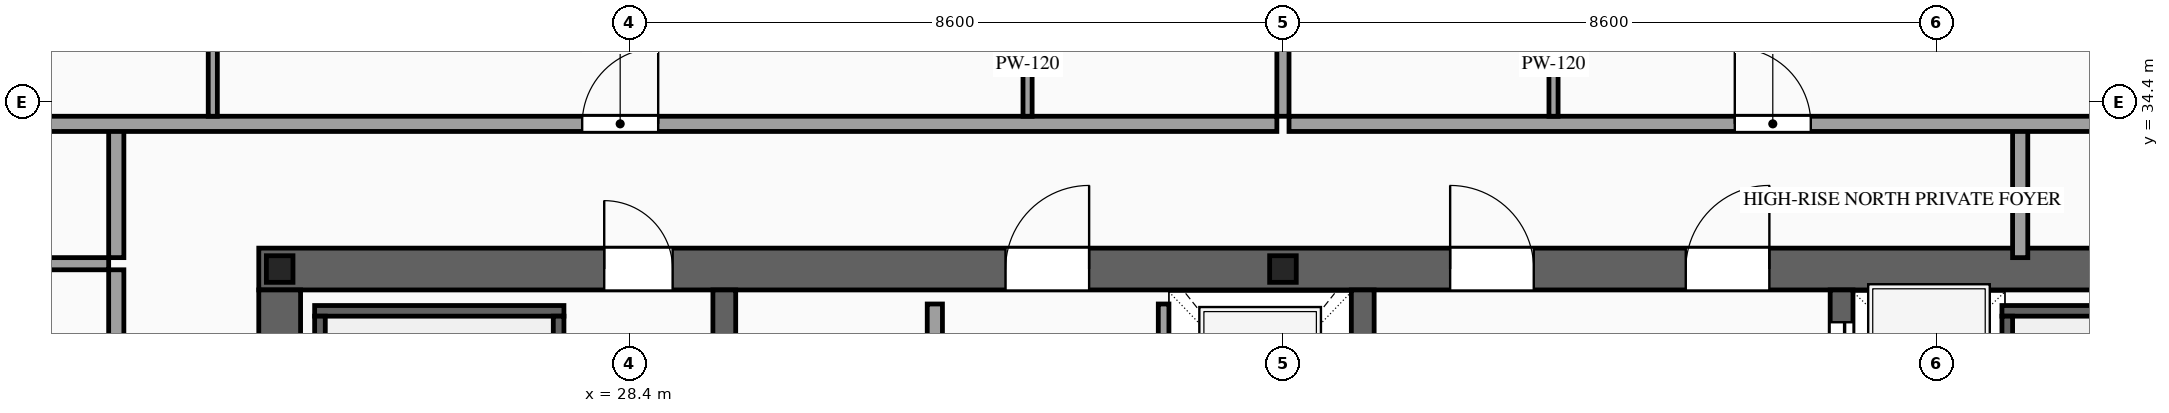
"""IFC4 building model, lengths in metres.
Left out: names, types, materials, properties, quantities, classifications, styles, units other than length and angle.
Written with IfcOpenShell. Run it as: python <this file> out.ifc"""

import sys

from ifc_helpers import new_model, si_unit, direction, frame, frame_2d, origin, origin_2d, place, context, subcontext, project, spatial, rectangle, i_section, extrude, source, transform, mapped, element, fill, save


model = new_model("IFC4")
c1 = context("Model", 3, precision=1e-05, world=origin(), true_north=direction((0.0, 1.0)))
c2 = subcontext(c1, "Body", "Model", "MODEL_VIEW")
j1 = project(units=[si_unit("LENGTHUNIT", "METRE"), si_unit("PLANEANGLEUNIT", "RADIAN")], contexts=[c1])
p1 = place(None, origin())
s1 = spatial("IfcSite", under=j1, at=p1, CompositionType="ELEMENT")
p2 = place(p1, origin())
s2 = spatial("IfcBuilding", under=s1, at=p2, CompositionType="ELEMENT")
p3 = place(p2, frame((0.0, 0.0, 268.1)))
s3 = spatial("IfcBuildingStorey", under=s2, at=p3, CompositionType="ELEMENT", Elevation=268.1)
p4 = place(p3, frame((23.525, 32.2, 0.0), z_axis=(0.0, 0.0, 1.0), x_axis=(1.0, 0.0, 0.0)))
e1 = element("IfcWall", 1, at=p4, inside=s3, PredefinedType="SHEAR", context=c2, shape_type="SweptSolid", body=[
    extrude(rectangle(XDim=26.95, YDim=0.55, at=frame_2d((13.475, 0.0))), origin(), (0.0, 0.0, 1.0), 3.5),
])
p5 = place(p4, frame((4.545, 0.0, 0.0)))
e2 = element("IfcOpeningElement", 2, at=p5, cuts=e1, PredefinedType="OPENING", context=c2, shape_type="SweptSolid", body=[
    extrude(rectangle(XDim=0.9, YDim=2.15, at=frame_2d((0.45, 1.075))), frame((0.0, 0.29, 0.0), z_axis=(0.0, -1.0, 0.0), x_axis=(1.0, 0.0, 0.0)), (0.0, 0.0, 1.0), 0.58),
])
p6 = place(p4, frame((9.825, 0.0, 0.0)))
e3 = element("IfcOpeningElement", 3, at=p6, cuts=e1, PredefinedType="OPENING", context=c2, shape_type="SweptSolid", body=[
    extrude(rectangle(XDim=1.1, YDim=2.2, at=frame_2d((0.55, 1.1))), frame((0.0, 0.29, 0.0), z_axis=(0.0, -1.0, 0.0), x_axis=(1.0, 0.0, 0.0)), (0.0, 0.0, 1.0), 0.58),
])
p7 = place(p4, frame((15.675, 0.0, 0.0)))
e4 = element("IfcOpeningElement", 4, at=p7, cuts=e1, PredefinedType="OPENING", context=c2, shape_type="SweptSolid", body=[
    extrude(rectangle(XDim=1.1, YDim=2.2, at=frame_2d((0.55, 1.1))), frame((0.0, 0.29, 0.0), z_axis=(0.0, -1.0, 0.0), x_axis=(1.0, 0.0, 0.0)), (0.0, 0.0, 1.0), 0.58),
])
p8 = place(p4, frame((18.775, 0.0, 0.0)))
e5 = element("IfcOpeningElement", 5, at=p8, cuts=e1, PredefinedType="OPENING", context=c2, shape_type="SweptSolid", body=[
    extrude(rectangle(XDim=1.1, YDim=2.2, at=frame_2d((0.55, 1.1))), frame((0.0, 0.29, 0.0), z_axis=(0.0, -1.0, 0.0), x_axis=(1.0, 0.0, 0.0)), (0.0, 0.0, 1.0), 0.58),
])
m1 = source(origin(), c2, "Body", "SweptSolid", [
    extrude(rectangle(XDim=12.25, YDim=0.55, at=frame_2d((6.125, 0.0))), origin(), (0.0, 0.0, 1.0), 3.5),
])
p9 = place(p3, frame((23.8, 19.675, 0.0), z_axis=(0.0, 0.0, 1.0), x_axis=(0.0, 1.0, 0.0)))
e6 = element("IfcWall", 6, at=p9, inside=s3, PredefinedType="SHEAR", context=c2, shape_type="MappedRepresentation", body=[
    mapped(m1, transform((0.0, 0.0, 0.0), scale=1.0)),
])
m2 = source(origin(), c2, "Body", "SweptSolid", [
    extrude(rectangle(XDim=12.25, YDim=0.3, at=frame_2d((6.125, 0.0))), origin(), (0.0, 0.0, 1.0), 3.5),
])
for number, where, z_axis, x_axis in (
    (7, (29.65, 19.675, 0.0), (0.0, 0.0, 1.0), (0.0, 1.0, 0.0)),
    (8, (38.05, 19.675, 0.0), (0.0, 0.0, 1.0), (0.0, 1.0, 0.0)),
):
    element("IfcWall", number, at=place(p3, frame(where, z_axis=z_axis, x_axis=x_axis)), inside=s3, PredefinedType="SOLIDWALL", context=c2, shape_type="MappedRepresentation", body=[
        mapped(m2, transform((0.0, 0.0, 0.0), scale=1.0)),
    ])
p10 = place(p3, frame((44.35, 19.675, 0.0), z_axis=(0.0, 0.0, 1.0), x_axis=(0.0, 1.0, 0.0)))
e9 = element("IfcWall", 9, at=p10, inside=s3, PredefinedType="SOLIDWALL", context=c2, shape_type="SweptSolid", body=[
    extrude(rectangle(XDim=12.25, YDim=0.3, at=frame_2d((6.125, 0.0))), origin(), (0.0, 0.0, 1.0), 3.5),
])
p11 = place(p10, frame((6.525, 0.0, 0.0)))
e10 = element("IfcOpeningElement", 10, at=p11, cuts=e9, PredefinedType="OPENING", context=c2, shape_type="SweptSolid", body=[
    extrude(rectangle(XDim=1.1, YDim=2.2, at=frame_2d((0.55, 1.1))), frame((0.0, 0.165, 0.0), z_axis=(0.0, -1.0, 0.0), x_axis=(1.0, 0.0, 0.0)), (0.0, 0.0, 1.0), 0.33),
])
p12 = place(p10, frame((8.625, 0.0, 0.0)))
e11 = element("IfcOpeningElement", 11, at=p12, cuts=e9, PredefinedType="OPENING", context=c2, shape_type="SweptSolid", body=[
    extrude(rectangle(XDim=1.1, YDim=2.2, at=frame_2d((0.55, 1.1))), frame((0.0, 0.165, 0.0), z_axis=(0.0, -1.0, 0.0), x_axis=(1.0, 0.0, 0.0)), (0.0, 0.0, 1.0), 0.33),
])
p13 = place(p10, frame((10.725, 0.0, 0.0)))
e12 = element("IfcOpeningElement", 12, at=p13, cuts=e9, PredefinedType="OPENING", context=c2, shape_type="SweptSolid", body=[
    extrude(rectangle(XDim=1.1, YDim=2.2, at=frame_2d((0.55, 1.1))), frame((0.0, 0.165, 0.0), z_axis=(0.0, -1.0, 0.0), x_axis=(1.0, 0.0, 0.0)), (0.0, 0.0, 1.0), 0.33),
])
m3 = source(origin(), c2, "Body", "SweptSolid", [
    extrude(i_section(OverallWidth=0.35, OverallDepth=0.35, WebThickness=0.012, FlangeThickness=0.019, at=origin_2d()), origin(), (0.0, 0.0, 1.0), 3.5),
])
for number, where, z_axis, x_axis in (
    (13, (23.8, 32.2, 0.0), (0.0, 0.0, 1.0), (1.0, 0.0, 0.0)),
    (14, (37.0, 32.2, 0.0), (0.0, 0.0, 1.0), (1.0, 0.0, 0.0)),
):
    element("IfcColumn", number, at=place(p3, frame(where, z_axis=z_axis, x_axis=x_axis)), inside=s3, PredefinedType="COLUMN", context=c2, shape_type="MappedRepresentation", body=[
        mapped(m3, transform((0.0, 0.0, 0.0), scale=1.0)),
    ])
p14 = place(p3, frame((35.43, 29.4, 0.0), z_axis=(0.0, 0.0, 1.0), x_axis=(0.0, 1.0, 0.0)))
e15 = element("IfcWall", 15, at=p14, inside=s3, PredefinedType="SOLIDWALL", context=c2, shape_type="SweptSolid", body=[
    extrude(rectangle(XDim=2.34, YDim=0.14, at=frame_2d((1.17, 0.0))), origin(), (0.0, 0.0, 1.0), 3.28),
])
p15 = place(p14, frame((0.62, 0.0, 0.0)))
e16 = element("IfcOpeningElement", 16, at=p15, cuts=e15, PredefinedType="OPENING", context=c2, shape_type="SweptSolid", body=[
    extrude(rectangle(XDim=1.1, YDim=2.2, at=frame_2d((0.55, 1.1))), frame((0.0, 0.085, 0.0), z_axis=(0.0, -1.0, 0.0), x_axis=(1.0, 0.0, 0.0)), (0.0, 0.0, 1.0), 0.17),
])
m4 = source(origin(), c2, "Body", "SweptSolid", [
    extrude(rectangle(XDim=3.28, YDim=0.14, at=frame_2d((1.64, 0.0))), origin(), (0.0, 0.0, 1.0), 3.28),
])
p16 = place(p3, frame((24.26, 31.65, 0.0), z_axis=(0.0, 0.0, 1.0), x_axis=(1.0, 0.0, 0.0)))
e17 = element("IfcWall", 17, at=p16, inside=s3, PredefinedType="SOLIDWALL", context=c2, shape_type="MappedRepresentation", body=[
    mapped(m4, transform((0.0, 0.0, 0.0), scale=1.0)),
])
m5 = source(origin(), c2, "Body", "SweptSolid", [
    extrude(rectangle(XDim=8.94, YDim=0.14, at=frame_2d((4.47, 0.0))), origin(), (0.0, 0.0, 1.0), 3.28),
])
for number, where, z_axis, x_axis in (
    (18, (24.33, 22.64, 0.0), (0.0, 0.0, 1.0), (0.0, 1.0, 0.0)),
    (19, (27.47, 22.64, 0.0), (0.0, 0.0, 1.0), (0.0, 1.0, 0.0)),
):
    element("IfcWall", number, at=place(p3, frame(where, z_axis=z_axis, x_axis=x_axis)), inside=s3, PredefinedType="SOLIDWALL", context=c2, shape_type="MappedRepresentation", body=[
        mapped(m5, transform((0.0, 0.0, 0.0), scale=1.0)),
    ])
p17 = place(p3, frame((46.46, 31.65, 0.0), z_axis=(0.0, 0.0, 1.0), x_axis=(1.0, 0.0, 0.0)))
e20 = element("IfcWall", 20, at=p17, inside=s3, PredefinedType="SOLIDWALL", context=c2, shape_type="MappedRepresentation", body=[
    mapped(m4, transform((0.0, 0.0, 0.0), scale=1.0)),
])
p18 = place(p3, frame((46.53, 22.64, 0.0), z_axis=(0.0, 0.0, 1.0), x_axis=(0.0, 1.0, 0.0)))
e21 = element("IfcWall", 21, at=p18, inside=s3, PredefinedType="SOLIDWALL", context=c2, shape_type="MappedRepresentation", body=[
    mapped(m5, transform((0.0, 0.0, 0.0), scale=1.0)),
])
p19 = place(p3, frame((32.42, 28.05, 0.0), z_axis=(0.0, 0.0, 1.0), x_axis=(0.0, 1.0, 0.0)))
e22 = element("IfcWall", 22, at=p19, inside=s3, PredefinedType="PARTITIONING", context=c2, shape_type="SweptSolid", body=[
    extrude(rectangle(XDim=3.69, YDim=0.2, at=frame_2d((1.845, 0.0))), origin(), (0.0, 0.0, 1.0), 3.28),
])
p20 = place(p19, frame((1.395, 0.0, 0.0)))
e23 = element("IfcOpeningElement", 23, at=p20, cuts=e22, PredefinedType="OPENING", context=c2, shape_type="SweptSolid", body=[
    extrude(rectangle(XDim=0.9, YDim=2.15, at=frame_2d((0.45, 1.075))), frame((0.0, 0.115, 0.0), z_axis=(0.0, -1.0, 0.0), x_axis=(1.0, 0.0, 0.0)), (0.0, 0.0, 1.0), 0.23),
])
m6 = source(origin(), c2, "Body", "SweptSolid", [
    extrude(rectangle(XDim=1.7, YDim=0.2, at=frame_2d((0.85, 0.0))), origin(), (0.0, 0.0, 1.0), 3.28),
])
for number, where, z_axis, x_axis in (
    (24, (21.65, 32.35, 0.0), (0.0, 0.0, 1.0), (0.0, 1.0, 0.0)),
    (25, (46.7, 32.35, 0.0), (0.0, 0.0, 1.0), (0.0, 1.0, 0.0)),
):
    element("IfcWall", number, at=place(p3, frame(where, z_axis=z_axis, x_axis=x_axis)), inside=s3, PredefinedType="PARTITIONING", context=c2, shape_type="MappedRepresentation", body=[
        mapped(m6, transform((0.0, 0.0, 0.0), scale=1.0)),
    ])
p21 = place(p3, frame((19.44, 34.11, 0.0), z_axis=(0.0, 0.0, 1.0), x_axis=(1.0, 0.0, 0.0)))
e26 = element("IfcWall", 26, at=p21, inside=s3, PredefinedType="PARTITIONING", context=c2, shape_type="SweptSolid", body=[
    extrude(rectangle(XDim=17.48, YDim=0.2, at=frame_2d((8.74, 0.0))), origin(), (0.0, 0.0, 1.0), 3.28),
])
p22 = place(p21, frame((8.34, 0.0, 0.0)))
e27 = element("IfcOpeningElement", 27, at=p22, cuts=e26, PredefinedType="OPENING", context=c2, shape_type="SweptSolid", body=[
    extrude(rectangle(XDim=1.0, YDim=2.2, at=frame_2d((0.5, 1.1))), frame((0.0, 0.115, 0.0), z_axis=(0.0, -1.0, 0.0), x_axis=(1.0, 0.0, 0.0)), (0.0, 0.0, 1.0), 0.23),
])
m7 = source(origin(), c2, "Body", "SweptSolid", [
    extrude(rectangle(XDim=12.04, YDim=0.16, at=frame_2d((6.02, 0.0))), origin(), (0.0, 0.0, 1.0), 2.787),
])
p23 = place(p3, frame((37.0, 34.21, 0.0), z_axis=(0.0, 0.0, 1.0), x_axis=(0.0, 1.0, 0.0)))
e28 = element("IfcWall", 28, at=p23, inside=s3, PredefinedType="PARTITIONING", context=c2, shape_type="MappedRepresentation", body=[
    mapped(m7, transform((0.0, 0.0, 0.0), scale=1.0)),
])
p24 = place(p3, frame((22.92, 34.21, 0.0), z_axis=(0.0, 0.0, 1.0), x_axis=(0.0, 1.0, 0.0)))
e29 = element("IfcWall", 29, at=p24, inside=s3, PredefinedType="PARTITIONING", context=c2, shape_type="SweptSolid", body=[
    extrude(rectangle(XDim=4.11, YDim=0.12, at=frame_2d((2.055, 0.0))), origin(), (0.0, 0.0, 1.0), 3.28),
])
p25 = place(p24, frame((1.63, 0.0, 0.0)))
e30 = element("IfcOpeningElement", 30, at=p25, cuts=e29, PredefinedType="OPENING", context=c2, shape_type="SweptSolid", body=[
    extrude(rectangle(XDim=0.85, YDim=2.1, at=frame_2d((0.425, 1.05))), frame((0.0, 0.075, 0.0), z_axis=(0.0, -1.0, 0.0), x_axis=(1.0, 0.0, 0.0)), (0.0, 0.0, 1.0), 0.15),
])
p26 = place(p3, frame((33.64, 34.21, 0.0), z_axis=(0.0, 0.0, 1.0), x_axis=(0.0, 1.0, 0.0)))
e31 = element("IfcWall", 31, at=p26, inside=s3, PredefinedType="PARTITIONING", context=c2, shape_type="SweptSolid", body=[
    extrude(rectangle(XDim=4.11, YDim=0.12, at=frame_2d((2.055, 0.0))), origin(), (0.0, 0.0, 1.0), 3.28),
])
p27 = place(p26, frame((1.63, 0.0, 0.0)))
e32 = element("IfcOpeningElement", 32, at=p27, cuts=e31, PredefinedType="OPENING", context=c2, shape_type="SweptSolid", body=[
    extrude(rectangle(XDim=0.85, YDim=2.1, at=frame_2d((0.425, 1.05))), frame((0.0, 0.075, 0.0), z_axis=(0.0, -1.0, 0.0), x_axis=(1.0, 0.0, 0.0)), (0.0, 0.0, 1.0), 0.15),
])
p28 = place(p3, frame((37.08, 34.11, 0.0), z_axis=(0.0, 0.0, 1.0), x_axis=(1.0, 0.0, 0.0)))
e33 = element("IfcWall", 33, at=p28, inside=s3, PredefinedType="PARTITIONING", context=c2, shape_type="SweptSolid", body=[
    extrude(rectangle(XDim=17.48, YDim=0.2, at=frame_2d((8.74, 0.0))), origin(), (0.0, 0.0, 1.0), 3.28),
])
p29 = place(p28, frame((5.865, 0.0, 0.0)))
e34 = element("IfcOpeningElement", 34, at=p29, cuts=e33, PredefinedType="OPENING", context=c2, shape_type="SweptSolid", body=[
    extrude(rectangle(XDim=1.0, YDim=2.2, at=frame_2d((0.5, 1.1))), frame((0.0, 0.115, 0.0), z_axis=(0.0, -1.0, 0.0), x_axis=(1.0, 0.0, 0.0)), (0.0, 0.0, 1.0), 0.23),
])
p30 = place(p3, frame((40.56, 34.21, 0.0), z_axis=(0.0, 0.0, 1.0), x_axis=(0.0, 1.0, 0.0)))
e35 = element("IfcWall", 35, at=p30, inside=s3, PredefinedType="PARTITIONING", context=c2, shape_type="SweptSolid", body=[
    extrude(rectangle(XDim=4.11, YDim=0.12, at=frame_2d((2.055, 0.0))), origin(), (0.0, 0.0, 1.0), 3.28),
])
p31 = place(p30, frame((1.63, 0.0, 0.0)))
e36 = element("IfcOpeningElement", 36, at=p31, cuts=e35, PredefinedType="OPENING", context=c2, shape_type="SweptSolid", body=[
    extrude(rectangle(XDim=0.85, YDim=2.1, at=frame_2d((0.425, 1.05))), frame((0.0, 0.075, 0.0), z_axis=(0.0, -1.0, 0.0), x_axis=(1.0, 0.0, 0.0)), (0.0, 0.0, 1.0), 0.15),
])
p32 = place(p3, frame((21.65, 19.41, 0.0), z_axis=(0.0, 0.0, 1.0), x_axis=(0.0, 1.0, 0.0)))
e37 = element("IfcWall", 37, at=p32, inside=s3, PredefinedType="PARTITIONING", context=c2, shape_type="SweptSolid", body=[
    extrude(rectangle(XDim=12.78, YDim=0.2, at=frame_2d((6.39, 0.0))), origin(), (0.0, 0.0, 1.0), 3.28),
])
p33 = place(p32, frame((5.89, 0.0, 0.0)))
e38 = element("IfcOpeningElement", 38, at=p33, cuts=e37, PredefinedType="OPENING", context=c2, shape_type="SweptSolid", body=[
    extrude(rectangle(XDim=1.0, YDim=2.2, at=frame_2d((0.5, 1.1))), frame((0.0, 0.115, 0.0), z_axis=(0.0, -1.0, 0.0), x_axis=(1.0, 0.0, 0.0)), (0.0, 0.0, 1.0), 0.23),
])
m8 = source(origin(), c2, "Body", "SweptSolid", [
    extrude(rectangle(XDim=5.0, YDim=0.16, at=frame_2d((2.5, 0.0))), origin(), (0.0, 0.0, 1.0), 2.825),
])
p34 = place(p3, frame((16.55, 32.27, 0.0), z_axis=(0.0, 0.0, 1.0), x_axis=(1.0, 0.0, 0.0)))
e39 = element("IfcWall", 39, at=p34, inside=s3, PredefinedType="PARTITIONING", context=c2, shape_type="MappedRepresentation", body=[
    mapped(m8, transform((0.0, 0.0, 0.0), scale=1.0)),
])
m9 = source(origin(), c2, "Body", "SweptSolid", [
    extrude(rectangle(XDim=1.1, YDim=2.2, at=frame_2d((0.55, 1.1))), frame((0.0, 0.025, 0.0), z_axis=(0.0, -1.0, 0.0), x_axis=(1.0, 0.0, 0.0)), (0.0, 0.0, 1.0), 0.05),
])
p35 = place(p13, origin())
e40 = element("IfcDoor", 40, at=p35, inside=s3, OperationType="SLIDING_TO_LEFT", PredefinedType="DOOR", context=c2, shape_type="MappedRepresentation", body=[
    mapped(m9, transform((0.0, 0.0, 0.0), scale=1.0)),
])
fill(e12, e40)
m10 = source(origin(), c2, "Body", "SweptSolid", [
    extrude(rectangle(XDim=0.9, YDim=2.15, at=frame_2d((0.45, 1.075))), frame((0.0, 0.025, 0.0), z_axis=(0.0, -1.0, 0.0), x_axis=(1.0, 0.0, 0.0)), (0.0, 0.0, 1.0), 0.05),
])
p36 = place(p5, origin())
e41 = element("IfcDoor", 41, at=p36, inside=s3, OperationType="SINGLE_SWING_LEFT", PredefinedType="DOOR", context=c2, shape_type="MappedRepresentation", body=[
    mapped(m10, transform((0.0, 0.0, 0.0), scale=1.0)),
])
fill(e2, e41)
m11 = source(origin(), c2, "Body", "SweptSolid", [
    extrude(rectangle(XDim=1.1, YDim=2.2, at=frame_2d((0.55, 1.1))), frame((0.0, 0.025, 0.0), z_axis=(0.0, -1.0, 0.0), x_axis=(1.0, 0.0, 0.0)), (0.0, 0.0, 1.0), 0.05),
])
p37 = place(p6, origin())
e42 = element("IfcDoor", 42, at=p37, inside=s3, OperationType="SINGLE_SWING_RIGHT", PredefinedType="DOOR", context=c2, shape_type="MappedRepresentation", body=[
    mapped(m11, transform((0.0, 0.0, 0.0), scale=1.0)),
])
fill(e3, e42)
p38 = place(p7, origin())
e43 = element("IfcDoor", 43, at=p38, inside=s3, OperationType="SINGLE_SWING_LEFT", PredefinedType="DOOR", context=c2, shape_type="MappedRepresentation", body=[
    mapped(m11, transform((0.0, 0.0, 0.0), scale=1.0)),
])
fill(e4, e43)
p39 = place(p8, origin())
e44 = element("IfcDoor", 44, at=p39, inside=s3, OperationType="SINGLE_SWING_RIGHT", PredefinedType="DOOR", context=c2, shape_type="MappedRepresentation", body=[
    mapped(m11, transform((0.0, 0.0, 0.0), scale=1.0)),
])
fill(e5, e44)
m12 = source(origin(), c2, "Body", "SweptSolid", [
    extrude(rectangle(XDim=1.0, YDim=2.2, at=frame_2d((0.5, 1.1))), frame((0.0, 0.025, 0.0), z_axis=(0.0, -1.0, 0.0), x_axis=(1.0, 0.0, 0.0)), (0.0, 0.0, 1.0), 0.05),
])
p40 = place(p22, origin())
e45 = element("IfcDoor", 45, at=p40, inside=s3, OperationType="SINGLE_SWING_RIGHT", PredefinedType="DOOR", context=c2, shape_type="MappedRepresentation", body=[
    mapped(m12, transform((0.0, 0.0, 0.0), scale=1.0)),
])
fill(e27, e45)
p41 = place(p29, origin())
e46 = element("IfcDoor", 46, at=p41, inside=s3, OperationType="SINGLE_SWING_LEFT", PredefinedType="DOOR", context=c2, shape_type="MappedRepresentation", body=[
    mapped(m12, transform((0.0, 0.0, 0.0), scale=1.0)),
])
fill(e34, e46)
save(model, sys.argv[1])
